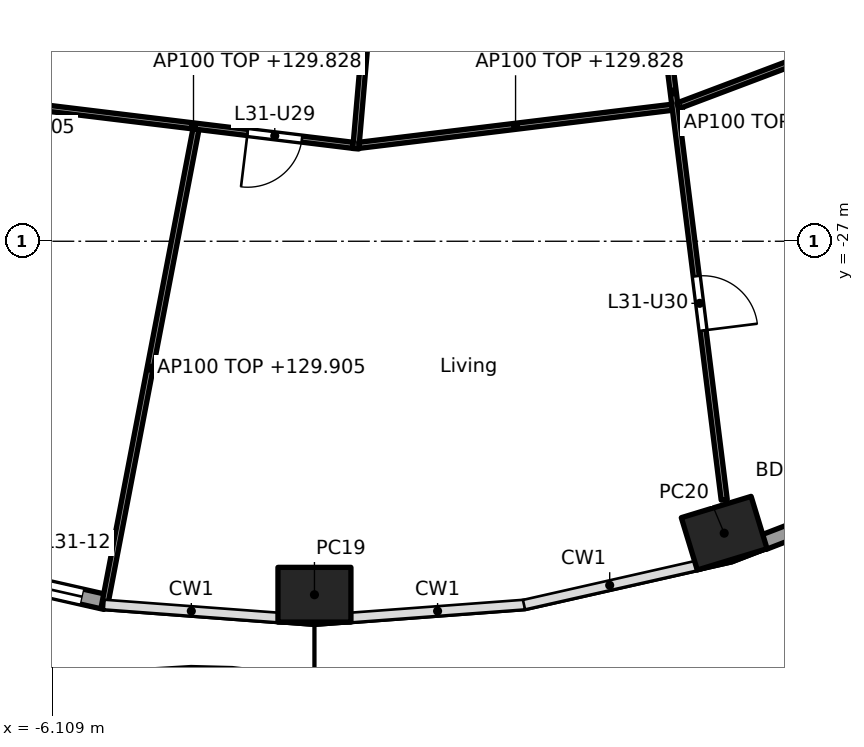
"""IFC4 building model, lengths in metres.
Left out: names, types, materials, properties, quantities, classifications, styles, units other than length and angle.
Written with IfcOpenShell. Run it as: python <this file> out.ifc"""

import sys

from ifc_helpers import new_model, si_unit, direction, frame, frame_2d, origin, origin_2d, place, context, subcontext, project, spatial, rectangle, hollow_rectangle, extrude, element, fill, save


model = new_model("IFC4")
c1 = context("Model", 3, precision=1e-05, world=origin(), true_north=direction((0.0, 1.0)))
c2 = subcontext(c1, "Body", "Model", "MODEL_VIEW")
j1 = project(units=[si_unit("LENGTHUNIT", "METRE"), si_unit("PLANEANGLEUNIT", "RADIAN")], contexts=[c1])
p1 = place(None, origin())
s1 = spatial("IfcSite", under=j1, at=p1, CompositionType="ELEMENT")
p2 = place(p1, origin())
s2 = spatial("IfcBuilding", under=s1, at=p2, CompositionType="ELEMENT")
p3 = place(p2, frame((0.0, 0.0, 127.0)))
s3 = spatial("IfcBuildingStorey", under=s2, at=p3, CompositionType="ELEMENT", Elevation=127.0)
for number, where, z_axis, x_axis in (
    (1, (-1.8, -32.813, 0.0), (0.0, 0.0, 1.0), (1.0, 0.0, 0.0)),
    (2, (4.938, -31.801, 0.0), (0.0, 0.0, 1.0), (0.957, 0.292, 0.0)),
):
    element("IfcColumn", number, at=place(p3, frame(where, z_axis=z_axis, x_axis=x_axis)), inside=s3, PredefinedType="COLUMN", context=c2, shape_type="SweptSolid", body=[
        extrude(hollow_rectangle(XDim=1.2, YDim=0.9, WallThickness=0.04, at=origin_2d()), origin(), (0.0, 0.0, 1.0), 3.7),
    ])
p4 = place(p3, frame((-5.236, -32.932, 0.0), z_axis=(0.0, 0.0, 1.0), x_axis=(-0.975339035722, 0.220711951186, 0.0)))
e3 = element("IfcWall", 3, at=p4, inside=s3, PredefinedType="SOLIDWALL", context=c2, shape_type="SweptSolid", body=[
    extrude(rectangle(XDim=2.89, YDim=0.25, at=frame_2d((1.445, 0.0))), origin(), (0.0, 0.0, 1.0), 3.44),
])
p5 = place(p4, frame((0.395, 0.0, 0.0)))
e4 = element("IfcOpeningElement", 4, at=p5, cuts=e3, PredefinedType="OPENING", context=c2, shape_type="SweptSolid", body=[
    extrude(rectangle(XDim=2.1, YDim=2.4, at=frame_2d((1.05, 1.2))), frame((0.0, 0.135, 0.0), z_axis=(0.0, -1.0, 0.0), x_axis=(1.0, 0.0, 0.0)), (0.0, 0.0, 1.0), 0.27),
])
p6 = place(p3, frame((8.31, -30.898, 0.0), z_axis=(0.0, 0.0, 1.0), x_axis=(-0.932845344347, -0.360277064952, 0.0)))
e5 = element("IfcWall", 5, at=p6, inside=s3, PredefinedType="SOLIDWALL", context=c2, shape_type="SweptSolid", body=[
    extrude(rectangle(XDim=2.923, YDim=0.25, at=frame_2d((1.462, 0.0))), origin(), (0.0, 0.0, 1.0), 3.44),
])
p7 = place(p6, frame((0.412, 0.0, 0.0)))
e6 = element("IfcOpeningElement", 6, at=p7, cuts=e5, PredefinedType="OPENING", context=c2, shape_type="SweptSolid", body=[
    extrude(rectangle(XDim=2.1, YDim=2.4, at=frame_2d((1.05, 1.2))), frame((0.0, 0.135, 0.0), z_axis=(0.0, -1.0, 0.0), x_axis=(1.0, 0.0, 0.0)), (0.0, 0.0, 1.0), 0.27),
])
p8 = place(p3, frame((-5.949, -17.591, 0.0), z_axis=(0.0, 0.0, 1.0), x_axis=(-0.40838467696, -0.912809923053, 0.0)))
e7 = element("IfcWall", 7, at=p8, inside=s3, PredefinedType="PARTITIONING", context=c2, shape_type="SweptSolid", body=[
    extrude(rectangle(XDim=14.665, YDim=0.1, at=frame_2d((7.333, 0.0))), origin(), (0.0, 0.0, 1.0), 2.905),
])
p9 = place(p8, frame((10.334, 0.0, 0.0)))
e8 = element("IfcOpeningElement", 8, at=p9, cuts=e7, PredefinedType="OPENING", context=c2, shape_type="SweptSolid", body=[
    extrude(rectangle(XDim=0.9, YDim=2.1, at=frame_2d((0.45, 1.05))), frame((0.0, 0.06, 0.0), z_axis=(0.0, -1.0, 0.0), x_axis=(1.0, 0.0, 0.0)), (0.0, 0.0, 1.0), 0.12),
])
p10 = place(p3, frame((-6.413, -24.784, 0.0), z_axis=(0.0, 0.0, 1.0), x_axis=(0.992690077723, -0.120691381588, 0.0)))
e9 = element("IfcWall", 9, at=p10, inside=s3, PredefinedType="PARTITIONING", context=c2, shape_type="SweptSolid", body=[
    extrude(rectangle(XDim=5.286, YDim=0.1, at=frame_2d((2.643, 0.0))), origin(), (0.0, 0.0, 1.0), 2.828),
])
p11 = place(p10, frame((3.539, 0.0, 0.0)))
e10 = element("IfcOpeningElement", 10, at=p11, cuts=e9, PredefinedType="OPENING", context=c2, shape_type="SweptSolid", body=[
    extrude(rectangle(XDim=0.9, YDim=2.1, at=frame_2d((0.45, 1.05))), frame((0.0, 0.06, 0.0), z_axis=(0.0, -1.0, 0.0), x_axis=(1.0, 0.0, 0.0)), (0.0, 0.0, 1.0), 0.12),
])
p12 = place(p3, frame((-3.749, -25.159, 0.0), z_axis=(0.0, 0.0, 1.0), x_axis=(-0.188392334675, -0.982093848996, 0.0)))
e11 = element("IfcWall", 11, at=p12, inside=s3, PredefinedType="PARTITIONING", context=c2, shape_type="SweptSolid", body=[
    extrude(rectangle(XDim=8.0, YDim=0.1, at=frame_2d((4.0, 0.0))), origin(), (0.0, 0.0, 1.0), 2.905),
])
p13 = place(p3, frame((-0.009, -12.664, 0.0), z_axis=(0.0, 0.0, 1.0), x_axis=(-0.086441225464, -0.996256952066, 0.0)))
e12 = element("IfcWall", 12, at=p13, inside=s3, PredefinedType="PARTITIONING", context=c2, shape_type="SweptSolid", body=[
    extrude(rectangle(XDim=12.862, YDim=0.1, at=frame_2d((6.431, 0.0))), origin(), (0.0, 0.0, 1.0), 2.756),
])
p14 = place(p13, frame((2.312, 0.0, 0.0)))
e13 = element("IfcOpeningElement", 13, at=p14, cuts=e12, PredefinedType="OPENING", context=c2, shape_type="SweptSolid", body=[
    extrude(rectangle(XDim=0.9, YDim=2.1, at=frame_2d((0.45, 1.05))), frame((0.0, 0.06, 0.0), z_axis=(0.0, -1.0, 0.0), x_axis=(1.0, 0.0, 0.0)), (0.0, 0.0, 1.0), 0.12),
])
p15 = place(p13, frame((8.718, 0.0, 0.0)))
e14 = element("IfcOpeningElement", 14, at=p15, cuts=e12, PredefinedType="OPENING", context=c2, shape_type="SweptSolid", body=[
    extrude(rectangle(XDim=0.9, YDim=2.1, at=frame_2d((0.45, 1.05))), frame((0.0, 0.06, 0.0), z_axis=(0.0, -1.0, 0.0), x_axis=(1.0, 0.0, 0.0)), (0.0, 0.0, 1.0), 0.12),
])
p16 = place(p3, frame((-1.066, -25.422, 0.0), z_axis=(0.0, 0.0, 1.0), x_axis=(0.992692993044, 0.120667400577, 0.0)))
e15 = element("IfcWall", 15, at=p16, inside=s3, PredefinedType="PARTITIONING", context=c2, shape_type="SweptSolid", body=[
    extrude(rectangle(XDim=5.186, YDim=0.1, at=frame_2d((2.593, 0.0))), origin(), (0.0, 0.0, 1.0), 2.828),
])
p17 = place(p3, frame((3.262, -17.839, 0.0), z_axis=(0.0, 0.0, 1.0), x_axis=(0.124074750982, -0.992272873845, 0.0)))
e16 = element("IfcWall", 16, at=p17, inside=s3, PredefinedType="PARTITIONING", context=c2, shape_type="SweptSolid", body=[
    extrude(rectangle(XDim=13.516, YDim=0.1, at=frame_2d((6.758, 0.0))), origin(), (0.0, 0.0, 1.0), 2.828),
])
p18 = place(p17, frame((3.078, 0.0, 0.0)))
e17 = element("IfcOpeningElement", 17, at=p18, cuts=e16, PredefinedType="OPENING", context=c2, shape_type="SweptSolid", body=[
    extrude(rectangle(XDim=0.9, YDim=2.1, at=frame_2d((0.45, 1.05))), frame((0.0, 0.06, 0.0), z_axis=(0.0, -1.0, 0.0), x_axis=(1.0, 0.0, 0.0)), (0.0, 0.0, 1.0), 0.12),
])
p19 = place(p17, frame((9.811, 0.0, 0.0)))
e18 = element("IfcOpeningElement", 18, at=p19, cuts=e16, PredefinedType="OPENING", context=c2, shape_type="SweptSolid", body=[
    extrude(rectangle(XDim=0.9, YDim=2.1, at=frame_2d((0.45, 1.05))), frame((0.0, 0.06, 0.0), z_axis=(0.0, -1.0, 0.0), x_axis=(1.0, 0.0, 0.0)), (0.0, 0.0, 1.0), 0.12),
])
p20 = place(p3, frame((4.178, -24.773, 0.0), z_axis=(0.0, 0.0, 1.0), x_axis=(0.935583811437, 0.353104703702, 0.0)))
e19 = element("IfcWall", 19, at=p20, inside=s3, PredefinedType="PARTITIONING", context=c2, shape_type="SweptSolid", body=[
    extrude(rectangle(XDim=5.184, YDim=0.1, at=frame_2d((2.592, 0.0))), origin(), (0.0, 0.0, 1.0), 2.828),
])
p21 = place(p5, origin())
e20 = element("IfcDoor", 20, at=p21, inside=s3, OperationType="SLIDING_TO_LEFT", PredefinedType="DOOR", context=c2, shape_type="SweptSolid", body=[
    extrude(rectangle(XDim=2.1, YDim=2.4, at=frame_2d((1.05, 1.2))), frame((0.0, 0.025, 0.0), z_axis=(0.0, -1.0, 0.0), x_axis=(1.0, 0.0, 0.0)), (0.0, 0.0, 1.0), 0.05),
])
fill(e4, e20)
p22 = place(p11, frame((0.9, 0.0, 0.0), x_axis=(-1.0, 0.0, 0.0)))
e21 = element("IfcDoor", 21, at=p22, inside=s3, OperationType="SINGLE_SWING_RIGHT", PredefinedType="DOOR", context=c2, shape_type="SweptSolid", body=[
    extrude(rectangle(XDim=0.9, YDim=2.1, at=frame_2d((0.45, 1.05))), frame((0.0, 0.025, 0.0), z_axis=(0.0, -1.0, 0.0), x_axis=(1.0, 0.0, 0.0)), (0.0, 0.0, 1.0), 0.05),
])
fill(e10, e21)
p23 = place(p19, origin())
e22 = element("IfcDoor", 22, at=p23, inside=s3, OperationType="SINGLE_SWING_RIGHT", PredefinedType="DOOR", context=c2, shape_type="SweptSolid", body=[
    extrude(rectangle(XDim=0.9, YDim=2.1, at=frame_2d((0.45, 1.05))), frame((0.0, 0.025, 0.0), z_axis=(0.0, -1.0, 0.0), x_axis=(1.0, 0.0, 0.0)), (0.0, 0.0, 1.0), 0.05),
])
fill(e18, e22)
save(model, sys.argv[1])
